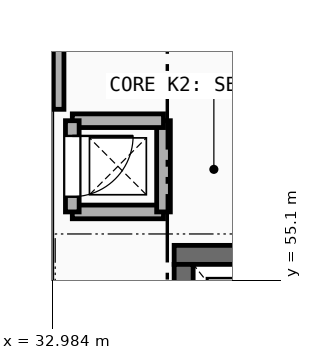
"""IFC4 building model, lengths in metres.
Left out: names, types, materials, properties, quantities, classifications, styles, units other than length and angle.
Written with IfcOpenShell. Run it as: python <this file> out.ifc"""

import sys

from ifc_helpers import new_model, si_unit, direction, frame, frame_2d, origin, place, context, subcontext, project, spatial, rectangle, extrude, element, fill, save


model = new_model("IFC4")
c1 = context("Model", 3, precision=1e-05, world=origin(), true_north=direction((0.0, 1.0)))
c2 = subcontext(c1, "Body", "Model", "MODEL_VIEW")
j1 = project(units=[si_unit("LENGTHUNIT", "METRE"), si_unit("PLANEANGLEUNIT", "RADIAN")], contexts=[c1])
p1 = place(None, origin())
s1 = spatial("IfcSite", under=j1, at=p1, CompositionType="ELEMENT")
p2 = place(p1, origin())
s2 = spatial("IfcBuilding", under=s1, at=p2, CompositionType="ELEMENT")
p3 = place(p2, frame((0.0, 0.0, 5.4)))
s3 = spatial("IfcBuildingStorey", under=s2, at=p3, CompositionType="ELEMENT", Elevation=5.4)
p4 = place(p3, frame((33.05, 57.35, 0.0), z_axis=(0.0, 0.0, 1.0), x_axis=(0.0, 1.0, 0.0)))
e1 = element("IfcWall", 1, at=p4, inside=s3, PredefinedType="PARTITIONING", context=c2, shape_type="SweptSolid", body=[
    extrude(rectangle(XDim=12.55, YDim=0.18, at=frame_2d((6.275, 0.0))), origin(), (0.0, 0.0, 1.0), 3.25),
])
p5 = place(p4, frame((5.775, 0.0, -0.01)))
e2 = element("IfcOpeningElement", 2, at=p5, cuts=e1, PredefinedType="OPENING", context=c2, shape_type="SweptSolid", body=[
    extrude(rectangle(XDim=1.0, YDim=2.16, at=frame_2d((0.5, 1.08))), frame((0.0, 0.1, 0.0), z_axis=(0.0, -1.0, 0.0), x_axis=(1.0, 0.0, 0.0)), (0.0, 0.0, 1.0), 0.2),
])
p6 = place(p3, frame((34.59, 55.435, 0.0), z_axis=(0.0, 0.0, 1.0), x_axis=(1.0, 0.0, 0.0)))
e3 = element("IfcWall", 3, at=p6, inside=s3, PredefinedType="SHEAR", context=c2, shape_type="SweptSolid", body=[
    extrude(rectangle(XDim=2.46, YDim=0.25, at=frame_2d((1.23, 0.0))), origin(), (0.0, 0.0, 1.0), 4.2),
])
p7 = place(p3, frame((34.715, 52.85, 0.0), z_axis=(0.0, 0.0, 1.0), x_axis=(0.0, 1.0, 0.0)))
e4 = element("IfcWall", 4, at=p7, inside=s3, PredefinedType="SHEAR", context=c2, shape_type="SweptSolid", body=[
    extrude(rectangle(XDim=2.46, YDim=0.25, at=frame_2d((1.23, 0.0))), origin(), (0.0, 0.0, 1.0), 4.2),
])
p8 = place(p7, frame((0.68, 0.0, -0.01)))
e5 = element("IfcOpeningElement", 5, at=p8, cuts=e4, PredefinedType="OPENING", context=c2, shape_type="SweptSolid", body=[
    extrude(rectangle(XDim=1.1, YDim=2.16, at=frame_2d((0.55, 1.08))), frame((0.0, 0.135, 0.0), z_axis=(0.0, -1.0, 0.0), x_axis=(1.0, 0.0, 0.0)), (0.0, 0.0, 1.0), 0.27),
])
for number, where, z_axis, x_axis in (
    (6, (33.25, 56.0, 0.0), (0.0, 0.0, 1.0), (1.0, 0.0, 0.0)),
    (7, (34.45, 56.0, 0.0), (0.0, 0.0, 1.0), (0.0, 1.0, 0.0)),
    (8, (34.45, 57.2, 0.0), (0.0, 0.0, 1.0), (-1.0, 0.0, 0.0)),
):
    element("IfcWall", number, at=place(p3, frame(where, z_axis=z_axis, x_axis=x_axis)), inside=s3, PredefinedType="SOLIDWALL", context=c2, shape_type="SweptSolid", body=[
        extrude(rectangle(XDim=1.2, YDim=0.18, at=frame_2d((0.6, 0.0))), origin(), (0.0, 0.0, 1.0), 3.97),
    ])
p9 = place(p3, frame((33.25, 57.2, 0.0), z_axis=(0.0, 0.0, 1.0), x_axis=(0.0, -1.0, 0.0)))
e9 = element("IfcWall", 9, at=p9, inside=s3, PredefinedType="SOLIDWALL", context=c2, shape_type="SweptSolid", body=[
    extrude(rectangle(XDim=1.2, YDim=0.18, at=frame_2d((0.6, 0.0))), origin(), (0.0, 0.0, 1.0), 3.97),
])
p10 = place(p9, frame((0.2, 0.0, -0.01)))
e10 = element("IfcOpeningElement", 10, at=p10, cuts=e9, PredefinedType="OPENING", context=c2, shape_type="SweptSolid", body=[
    extrude(rectangle(XDim=0.8, YDim=2.06, at=frame_2d((0.4, 1.03))), frame((0.0, 0.1, 0.0), z_axis=(0.0, -1.0, 0.0), x_axis=(1.0, 0.0, 0.0)), (0.0, 0.0, 1.0), 0.2),
])
p11 = place(p10, frame((0.0, 0.0, 0.01)))
e11 = element("IfcDoor", 11, at=p11, inside=s3, OperationType="SINGLE_SWING_LEFT", PredefinedType="DOOR", context=c2, shape_type="SweptSolid", body=[
    extrude(rectangle(XDim=0.8, YDim=2.05, at=frame_2d((0.4, 1.025))), frame((0.0, 0.025, 0.0), z_axis=(0.0, -1.0, 0.0), x_axis=(1.0, 0.0, 0.0)), (0.0, 0.0, 1.0), 0.05),
])
fill(e10, e11)
save(model, sys.argv[1])
